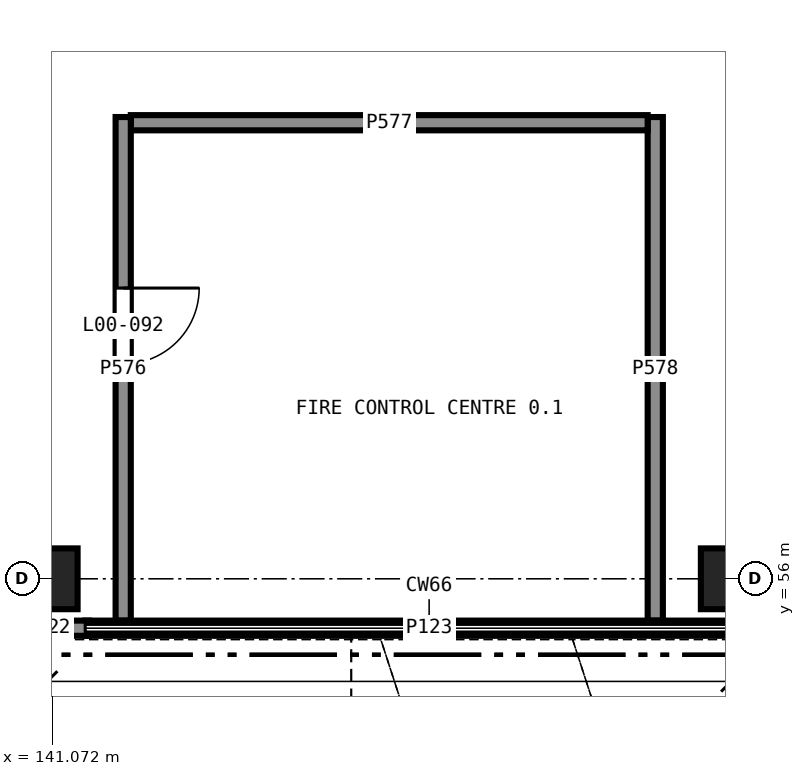
"""IFC4 building model, lengths in metres.
Left out: names, types, materials, properties, quantities, classifications, styles, units other than length and angle.
Written with IfcOpenShell. Run it as: python <this file> out.ifc"""

import sys

from ifc_helpers import new_model, si_unit, direction, frame, frame_2d, origin, origin_2d, place, context, subcontext, project, spatial, rectangle, extrude, element, fill, save


model = new_model("IFC4")
c1 = context("Model", 3, precision=1e-05, world=origin(), true_north=direction((0.0, 1.0)))
c2 = subcontext(c1, "Body", "Model", "MODEL_VIEW")
j1 = project(units=[si_unit("LENGTHUNIT", "METRE"), si_unit("PLANEANGLEUNIT", "RADIAN")], contexts=[c1])
p1 = place(None, origin())
s1 = spatial("IfcSite", under=j1, at=p1, CompositionType="ELEMENT")
p2 = place(p1, origin())
s2 = spatial("IfcBuilding", under=s1, at=p2, CompositionType="ELEMENT")
p3 = place(p2, origin())
s3 = spatial("IfcBuildingStorey", under=s2, at=p3, CompositionType="ELEMENT", Elevation=0.0)
for number, where, z_axis, x_axis in (
    (1, (141.0, 56.0, 0.0), (0.0, 0.0, 1.0), (1.0, 0.0, 0.0)),
    (2, (150.0, 56.0, 0.0), (0.0, 0.0, 1.0), (1.0, 0.0, 0.0)),
):
    element("IfcColumn", number, at=place(p3, frame(where, z_axis=z_axis, x_axis=x_axis)), inside=s3, PredefinedType="COLUMN", context=c2, shape_type="SweptSolid", body=[
        extrude(rectangle(XDim=0.8, YDim=0.8, at=origin_2d()), origin(), (0.0, 0.0, 1.0), 5.5),
    ])
p4 = place(p3, frame((140.45, 55.35, 0.0), z_axis=(0.0, 0.0, 1.0), x_axis=(1.0, 0.0, 0.0)))
e3 = element("IfcWall", 3, at=p4, inside=s3, PredefinedType="SOLIDWALL", context=c2, shape_type="SweptSolid", body=[
    extrude(rectangle(XDim=1.1, YDim=0.2, at=frame_2d((0.55, 0.0))), origin(), (0.0, 0.0, 1.0), 5.25),
])
p5 = place(p3, frame((141.5, 55.35, 0.0), z_axis=(0.0, 0.0, 1.0), x_axis=(1.0, 0.0, 0.0)))
e4 = element("IfcWall", 4, at=p5, inside=s3, PredefinedType="SOLIDWALL", context=c2, shape_type="SweptSolid", body=[
    extrude(rectangle(XDim=9.05, YDim=0.2, at=frame_2d((4.525, 0.0))), origin(), (0.0, 0.0, 1.0), 1.2),
])
p6 = place(p3, frame((142.0, 55.45, 0.0), z_axis=(0.0, 0.0, 1.0), x_axis=(0.0, 1.0, 0.0)))
e5 = element("IfcWall", 5, at=p6, inside=s3, PredefinedType="PARTITIONING", context=c2, shape_type="SweptSolid", body=[
    extrude(rectangle(XDim=6.625, YDim=0.2, at=frame_2d((3.312, 0.0))), origin(), (0.0, 0.0, 1.0), 5.25),
])
p7 = place(p6, frame((3.375, 0.0, 0.0)))
e6 = element("IfcOpeningElement", 6, at=p7, cuts=e5, PredefinedType="OPENING", context=c2, shape_type="SweptSolid", body=[
    extrude(rectangle(XDim=1.0, YDim=2.1, at=frame_2d((0.5, 1.05))), frame((0.0, 0.11, 0.0), z_axis=(0.0, -1.0, 0.0), x_axis=(1.0, 0.0, 0.0)), (0.0, 0.0, 1.0), 0.22),
])
p8 = place(p3, frame((142.1, 62.0, 0.0), z_axis=(0.0, 0.0, 1.0), x_axis=(1.0, 0.0, 0.0)))
e7 = element("IfcWall", 7, at=p8, inside=s3, PredefinedType="PARTITIONING", context=c2, shape_type="SweptSolid", body=[
    extrude(rectangle(XDim=6.8, YDim=0.2, at=frame_2d((3.4, 0.0))), origin(), (0.0, 0.0, 1.0), 5.25),
])
p9 = place(p3, frame((149.0, 55.45, 0.0), z_axis=(0.0, 0.0, 1.0), x_axis=(0.0, 1.0, 0.0)))
e8 = element("IfcWall", 8, at=p9, inside=s3, PredefinedType="PARTITIONING", context=c2, shape_type="SweptSolid", body=[
    extrude(rectangle(XDim=6.625, YDim=0.2, at=frame_2d((3.312, 0.0))), origin(), (0.0, 0.0, 1.0), 5.25),
])
p10 = place(p7, frame((1.0, 0.0, 0.0), z_axis=(0.0, 0.0, 1.0), x_axis=(-1.0, 0.0, 0.0)))
e9 = element("IfcDoor", 9, at=p10, inside=s3, OperationType="SINGLE_SWING_RIGHT", PredefinedType="DOOR", context=c2, shape_type="SweptSolid", body=[
    extrude(rectangle(XDim=1.0, YDim=2.1, at=frame_2d((0.5, 1.05))), frame((0.0, 0.025, 0.0), z_axis=(0.0, -1.0, 0.0), x_axis=(1.0, 0.0, 0.0)), (0.0, 0.0, 1.0), 0.05),
])
fill(e6, e9)
save(model, sys.argv[1])
